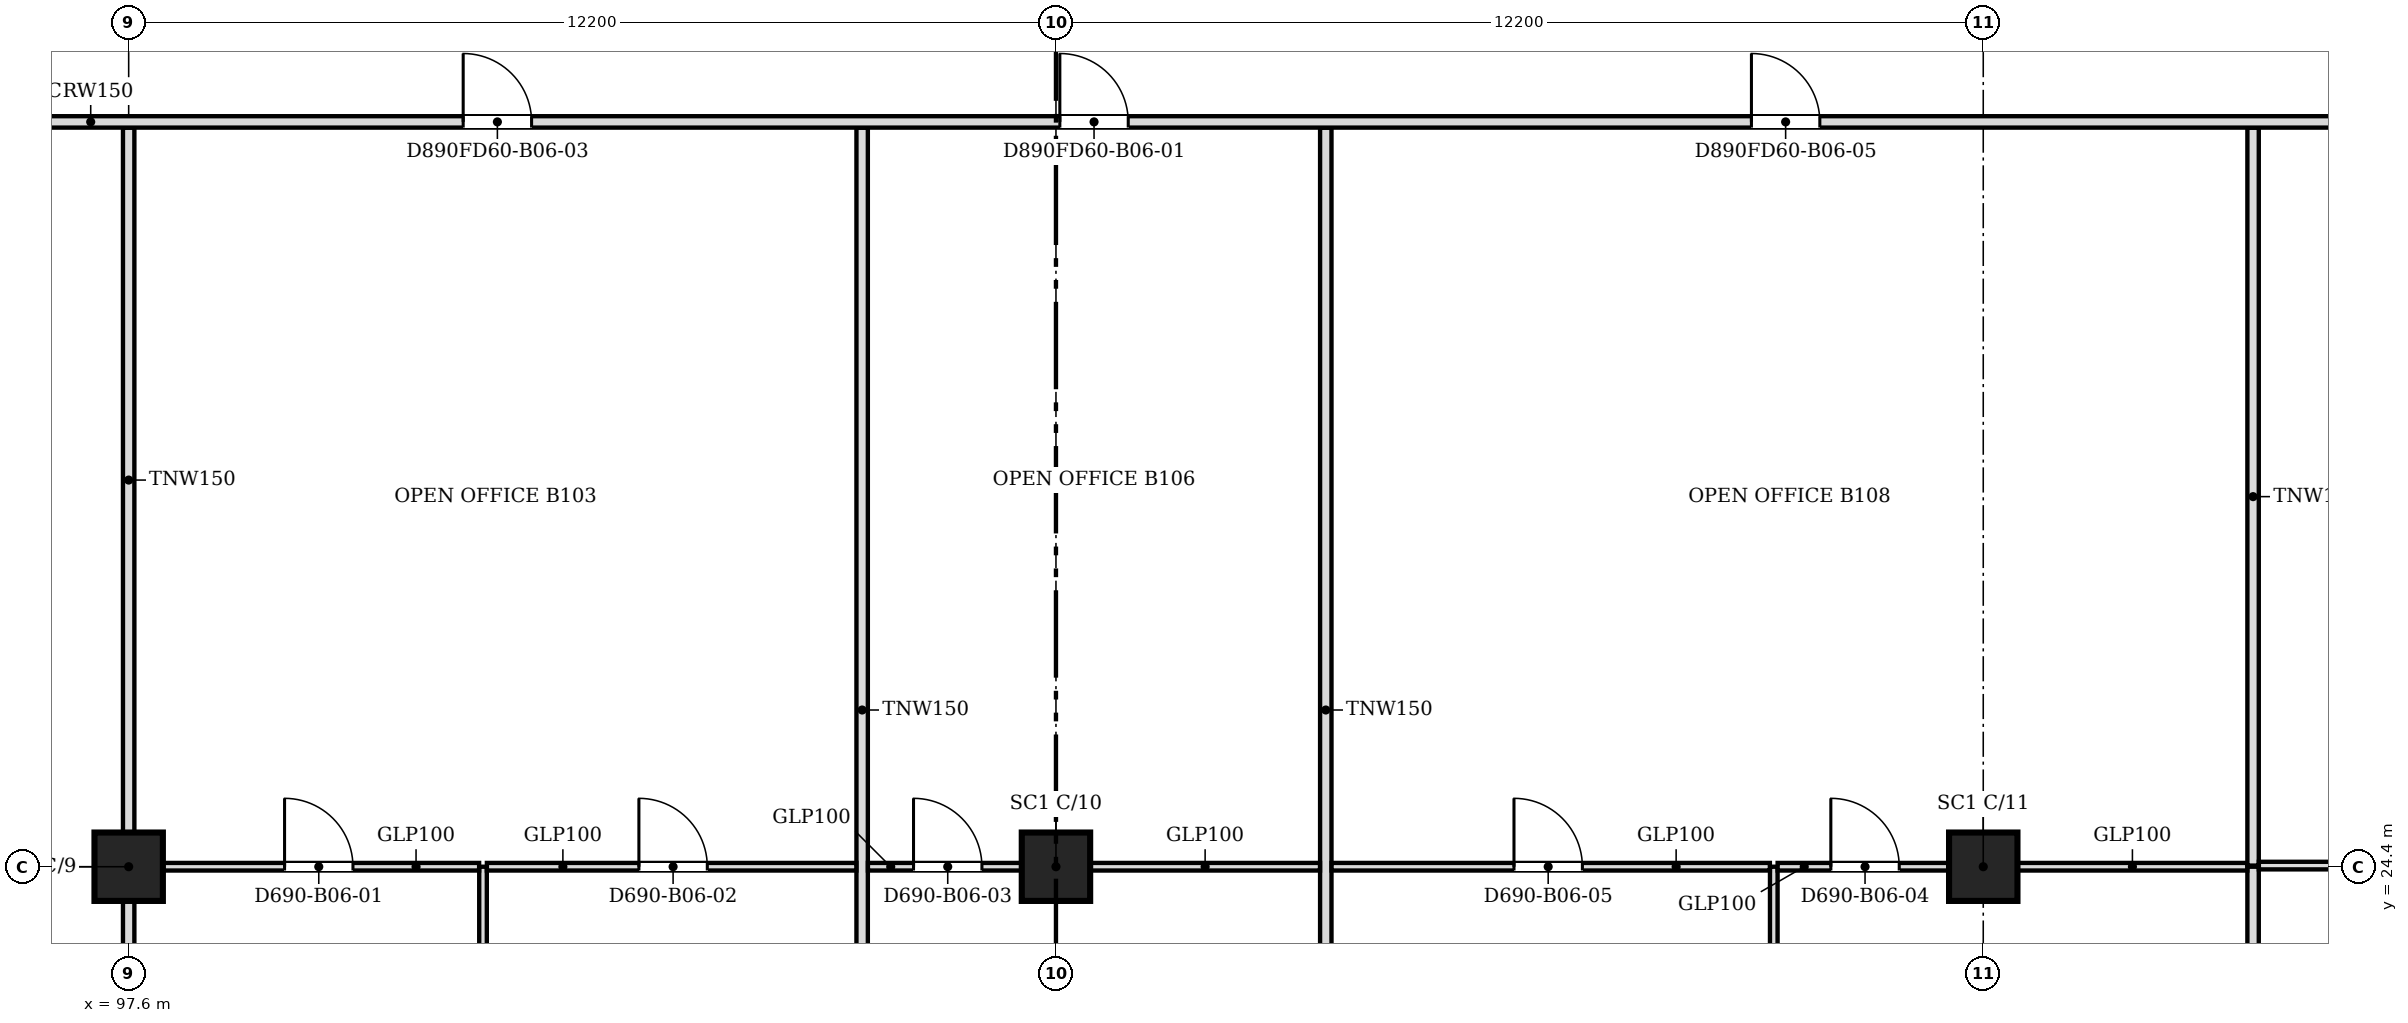
"""IFC4 building model, lengths in metres.
Left out: names, types, materials, properties, quantities, classifications, styles, units other than length and angle.
Written with IfcOpenShell. Run it as: python <this file> out.ifc"""

import sys

from ifc_helpers import new_model, si_unit, direction, frame, frame_2d, origin, origin_2d, place, context, subcontext, project, spatial, rectangle, extrude, source, transform, mapped, element, fill, save


model = new_model("IFC4")
c1 = context("Model", 3, precision=1e-05, world=origin(), true_north=direction((0.0, 1.0)))
c2 = subcontext(c1, "Body", "Model", "MODEL_VIEW")
j1 = project(units=[si_unit("LENGTHUNIT", "METRE"), si_unit("PLANEANGLEUNIT", "RADIAN")], contexts=[c1])
p1 = place(None, origin())
s1 = spatial("IfcSite", under=j1, at=p1, CompositionType="ELEMENT")
p2 = place(p1, origin())
s2 = spatial("IfcBuilding", under=s1, at=p2, CompositionType="ELEMENT")
p3 = place(p2, frame((0.0, 0.0, 56.2)))
s3 = spatial("IfcBuildingStorey", under=s2, at=p3, CompositionType="ELEMENT", Elevation=56.2)
for number, where, z_axis, x_axis in (
    (1, (97.6, 24.4, 0.0), (0.0, 0.0, 1.0), (1.0, 0.0, 0.0)),
    (2, (109.8, 24.4, 0.0), (0.0, 0.0, 1.0), (1.0, 0.0, 0.0)),
    (3, (122.0, 24.4, 0.0), (0.0, 0.0, 1.0), (1.0, 0.0, 0.0)),
):
    element("IfcColumn", number, at=place(p3, frame(where, z_axis=z_axis, x_axis=x_axis)), inside=s3, PredefinedType="COLUMN", context=c2, shape_type="SweptSolid", body=[
        extrude(rectangle(XDim=0.9, YDim=0.9, at=origin_2d()), origin(), (0.0, 0.0, 1.0), 3.6),
    ])
p4 = place(p3, frame((97.6, 18.8, 0.0), z_axis=(0.0, 0.0, 1.0), x_axis=(0.0, 1.0, 0.0)))
e4 = element("IfcWall", 4, at=p4, inside=s3, PredefinedType="PARTITIONING", context=c2, shape_type="SweptSolid", body=[
    extrude(rectangle(XDim=5.149, YDim=0.15, at=frame_2d((2.574, 0.0))), origin(), (0.0, 0.0, 1.0), 3.067),
])
p5 = place(p3, frame((102.262, 18.8, 0.0), z_axis=(0.0, 0.0, 1.0), x_axis=(0.0, 1.0, 0.0)))
e5 = element("IfcWall", 5, at=p5, inside=s3, PredefinedType="PARTITIONING", context=c2, shape_type="SweptSolid", body=[
    extrude(rectangle(XDim=5.6, YDim=0.1, at=frame_2d((2.8, 0.0))), origin(), (0.0, 0.0, 1.0), 3.067),
])
for number, where, z_axis, x_axis in (
    (6, (107.25, 18.8, 0.0), (0.0, 0.0, 1.0), (0.0, 1.0, 0.0)),
    (7, (113.35, 18.8, 0.0), (0.0, 0.0, 1.0), (0.0, 1.0, 0.0)),
):
    element("IfcWall", number, at=place(p3, frame(where, z_axis=z_axis, x_axis=x_axis)), inside=s3, PredefinedType="PARTITIONING", context=c2, shape_type="SweptSolid", body=[
        extrude(rectangle(XDim=15.324, YDim=0.15, at=frame_2d((7.662, 0.0))), origin(), (0.0, 0.0, 1.0), 3.067),
    ])
p6 = place(p3, frame((119.244, 18.8, 0.0), z_axis=(0.0, 0.0, 1.0), x_axis=(0.0, 1.0, 0.0)))
e8 = element("IfcWall", 8, at=p6, inside=s3, PredefinedType="PARTITIONING", context=c2, shape_type="SweptSolid", body=[
    extrude(rectangle(XDim=5.6, YDim=0.1, at=frame_2d((2.8, 0.0))), origin(), (0.0, 0.0, 1.0), 3.067),
])
p7 = place(p3, frame((125.55, 18.8, 0.0), z_axis=(0.0, 0.0, 1.0), x_axis=(0.0, 1.0, 0.0)))
e9 = element("IfcWall", 9, at=p7, inside=s3, PredefinedType="PARTITIONING", context=c2, shape_type="SweptSolid", body=[
    extrude(rectangle(XDim=5.6, YDim=0.15, at=frame_2d((2.8, 0.0))), origin(), (0.0, 0.0, 1.0), 3.067),
])
p8 = place(p3, frame((102.211, 24.4, 0.0), z_axis=(0.0, 0.0, 1.0), x_axis=(-1.0, 0.0, 0.0)))
e10 = element("IfcWall", 10, at=p8, inside=s3, PredefinedType="PARTITIONING", context=c2, shape_type="SweptSolid", body=[
    extrude(rectangle(XDim=4.16, YDim=0.1, at=frame_2d((2.08, 0.0))), origin(), (0.0, 0.0, 1.0), 3.067),
])
m1 = source(origin(), c2, "Body", "SweptSolid", [
    extrude(rectangle(XDim=0.9, YDim=2.1, at=frame_2d((0.45, 1.05))), frame((0.0, 0.06, 0.0), z_axis=(0.0, -1.0, 0.0), x_axis=(1.0, 0.0, 0.0)), (0.0, 0.0, 1.0), 0.12),
])
p9 = place(p8, frame((1.66, 0.0, 0.0)))
e11 = element("IfcOpeningElement", 11, at=p9, cuts=e10, PredefinedType="OPENING", context=c2, shape_type="MappedRepresentation", body=[
    mapped(m1, transform((0.0, 0.0, 0.0), scale=1.0)),
])
p10 = place(p3, frame((107.174, 24.4, 0.0), z_axis=(0.0, 0.0, 1.0), x_axis=(-1.0, 0.0, 0.0)))
e12 = element("IfcWall", 12, at=p10, inside=s3, PredefinedType="PARTITIONING", context=c2, shape_type="SweptSolid", body=[
    extrude(rectangle(XDim=4.861, YDim=0.1, at=frame_2d((2.431, 0.0))), origin(), (0.0, 0.0, 1.0), 3.067),
])
p11 = place(p10, frame((1.961, 0.0, 0.0)))
e13 = element("IfcOpeningElement", 13, at=p11, cuts=e12, PredefinedType="OPENING", context=c2, shape_type="MappedRepresentation", body=[
    mapped(m1, transform((0.0, 0.0, 0.0), scale=1.0)),
])
p12 = place(p3, frame((109.349, 24.4, 0.0), z_axis=(0.0, 0.0, 1.0), x_axis=(-1.0, 0.0, 0.0)))
e14 = element("IfcWall", 14, at=p12, inside=s3, PredefinedType="PARTITIONING", context=c2, shape_type="SweptSolid", body=[
    extrude(rectangle(XDim=2.023, YDim=0.1, at=frame_2d((1.012, 0.0))), origin(), (0.0, 0.0, 1.0), 3.067),
])
p13 = place(p12, frame((0.523, 0.0, 0.0)))
e15 = element("IfcOpeningElement", 15, at=p13, cuts=e14, PredefinedType="OPENING", context=c2, shape_type="MappedRepresentation", body=[
    mapped(m1, transform((0.0, 0.0, 0.0), scale=1.0)),
])
p14 = place(p3, frame((110.251, 24.4, 0.0), z_axis=(0.0, 0.0, 1.0), x_axis=(1.0, 0.0, 0.0)))
e16 = element("IfcWall", 16, at=p14, inside=s3, PredefinedType="PARTITIONING", context=c2, shape_type="SweptSolid", body=[
    extrude(rectangle(XDim=3.023, YDim=0.1, at=frame_2d((1.511, 0.0))), origin(), (0.0, 0.0, 1.0), 3.067),
])
p15 = place(p3, frame((119.193, 24.4, 0.0), z_axis=(0.0, 0.0, 1.0), x_axis=(-1.0, 0.0, 0.0)))
e17 = element("IfcWall", 17, at=p15, inside=s3, PredefinedType="PARTITIONING", context=c2, shape_type="SweptSolid", body=[
    extrude(rectangle(XDim=5.767, YDim=0.1, at=frame_2d((2.883, 0.0))), origin(), (0.0, 0.0, 1.0), 3.067),
])
p16 = place(p15, frame((2.467, 0.0, 0.0)))
e18 = element("IfcOpeningElement", 18, at=p16, cuts=e17, PredefinedType="OPENING", context=c2, shape_type="MappedRepresentation", body=[
    mapped(m1, transform((0.0, 0.0, 0.0), scale=1.0)),
])
p17 = place(p3, frame((121.549, 24.4, 0.0), z_axis=(0.0, 0.0, 1.0), x_axis=(-1.0, 0.0, 0.0)))
e19 = element("IfcWall", 19, at=p17, inside=s3, PredefinedType="PARTITIONING", context=c2, shape_type="SweptSolid", body=[
    extrude(rectangle(XDim=2.254, YDim=0.1, at=frame_2d((1.127, 0.0))), origin(), (0.0, 0.0, 1.0), 3.067),
])
p18 = place(p17, frame((0.654, 0.0, 0.0)))
e20 = element("IfcOpeningElement", 20, at=p18, cuts=e19, PredefinedType="OPENING", context=c2, shape_type="MappedRepresentation", body=[
    mapped(m1, transform((0.0, 0.0, 0.0), scale=1.0)),
])
p19 = place(p3, frame((122.451, 24.4, 0.0), z_axis=(0.0, 0.0, 1.0), x_axis=(1.0, 0.0, 0.0)))
e21 = element("IfcWall", 21, at=p19, inside=s3, PredefinedType="PARTITIONING", context=c2, shape_type="SweptSolid", body=[
    extrude(rectangle(XDim=3.023, YDim=0.1, at=frame_2d((1.512, 0.0))), origin(), (0.0, 0.0, 1.0), 3.067),
])
p20 = place(p3, frame((125.55, 24.415, 0.0), z_axis=(0.0, 0.0, 1.0), x_axis=(0.0, 1.0, 0.0)))
e22 = element("IfcWall", 22, at=p20, inside=s3, PredefinedType="PARTITIONING", context=c2, shape_type="SweptSolid", body=[
    extrude(rectangle(XDim=9.709, YDim=0.15, at=frame_2d((4.854, 0.0))), origin(), (0.0, 0.0, 1.0), 3.067),
])
p21 = place(p3, frame((133.67, 24.415, 0.0), z_axis=(0.0, 0.0, 1.0), x_axis=(-1.0, 0.0, 0.0)))
e23 = element("IfcWall", 23, at=p21, inside=s3, PredefinedType="PARTITIONING", context=c2, shape_type="SweptSolid", body=[
    extrude(rectangle(XDim=8.044, YDim=0.1, at=frame_2d((4.022, 0.0))), origin(), (0.0, 0.0, 1.0), 3.067),
])
p22 = place(p21, frame((3.544, 0.0, 0.0)))
e24 = element("IfcOpeningElement", 24, at=p22, cuts=e23, PredefinedType="OPENING", context=c2, shape_type="MappedRepresentation", body=[
    mapped(m1, transform((0.0, 0.0, 0.0), scale=1.0)),
])
p23 = place(p3, frame((97.6, 24.851, 0.0), z_axis=(0.0, 0.0, 1.0), x_axis=(0.0, 1.0, 0.0)))
e25 = element("IfcWall", 25, at=p23, inside=s3, PredefinedType="PARTITIONING", context=c2, shape_type="SweptSolid", body=[
    extrude(rectangle(XDim=9.273, YDim=0.15, at=frame_2d((4.636, 0.0))), origin(), (0.0, 0.0, 1.0), 3.067),
])
p24 = place(p3, frame((133.7, 34.2, 0.0), z_axis=(0.0, 0.0, 1.0), x_axis=(-1.0, 0.0, 0.0)))
e26 = element("IfcWall", 26, at=p24, inside=s3, PredefinedType="PARTITIONING", context=c2, shape_type="SweptSolid", body=[
    extrude(rectangle(XDim=47.8, YDim=0.15, at=frame_2d((23.9, 0.0))), origin(), (0.0, 0.0, 1.0), 3.067),
])
m2 = source(origin(), c2, "Body", "SweptSolid", [
    extrude(rectangle(XDim=0.9, YDim=2.1, at=frame_2d((0.45, 1.05))), frame((0.0, 0.085, 0.0), z_axis=(0.0, -1.0, 0.0), x_axis=(1.0, 0.0, 0.0)), (0.0, 0.0, 1.0), 0.17),
])
p25 = place(p24, frame((22.949, 0.0, 0.0)))
e27 = element("IfcOpeningElement", 27, at=p25, cuts=e26, PredefinedType="OPENING", context=c2, shape_type="MappedRepresentation", body=[
    mapped(m2, transform((0.0, 0.0, 0.0), scale=1.0)),
])
p26 = place(p24, frame((3.649, 0.0, 0.0)))
e28 = element("IfcOpeningElement", 28, at=p26, cuts=e26, PredefinedType="OPENING", context=c2, shape_type="MappedRepresentation", body=[
    mapped(m2, transform((0.0, 0.0, 0.0), scale=1.0)),
])
p27 = place(p24, frame((30.799, 0.0, 0.0)))
e29 = element("IfcOpeningElement", 29, at=p27, cuts=e26, PredefinedType="OPENING", context=c2, shape_type="MappedRepresentation", body=[
    mapped(m2, transform((0.0, 0.0, 0.0), scale=1.0)),
])
p28 = place(p24, frame((41.5, 0.0, 0.0)))
e30 = element("IfcOpeningElement", 30, at=p28, cuts=e26, PredefinedType="OPENING", context=c2, shape_type="MappedRepresentation", body=[
    mapped(m2, transform((0.0, 0.0, 0.0), scale=1.0)),
])
p29 = place(p24, frame((13.85, 0.0, 0.0)))
e31 = element("IfcOpeningElement", 31, at=p29, cuts=e26, PredefinedType="OPENING", context=c2, shape_type="MappedRepresentation", body=[
    mapped(m2, transform((0.0, 0.0, 0.0), scale=1.0)),
])
m3 = source(origin(), c2, "Body", "SweptSolid", [
    extrude(rectangle(XDim=0.9, YDim=2.1, at=frame_2d((0.45, 1.05))), frame((0.0, 0.025, 0.0), z_axis=(0.0, -1.0, 0.0), x_axis=(1.0, 0.0, 0.0)), (0.0, 0.0, 1.0), 0.05),
])
p30 = place(p9, origin())
e32 = element("IfcDoor", 32, at=p30, inside=s3, OperationType="SINGLE_SWING_RIGHT", PredefinedType="DOOR", context=c2, shape_type="MappedRepresentation", body=[
    mapped(m3, transform((0.0, 0.0, 0.0), scale=1.0)),
])
fill(e11, e32)
p31 = place(p11, origin())
e33 = element("IfcDoor", 33, at=p31, inside=s3, OperationType="SINGLE_SWING_RIGHT", PredefinedType="DOOR", context=c2, shape_type="MappedRepresentation", body=[
    mapped(m3, transform((0.0, 0.0, 0.0), scale=1.0)),
])
fill(e13, e33)
p32 = place(p13, origin())
e34 = element("IfcDoor", 34, at=p32, inside=s3, OperationType="SINGLE_SWING_RIGHT", PredefinedType="DOOR", context=c2, shape_type="MappedRepresentation", body=[
    mapped(m3, transform((0.0, 0.0, 0.0), scale=1.0)),
])
fill(e15, e34)
p33 = place(p18, origin())
e35 = element("IfcDoor", 35, at=p33, inside=s3, OperationType="SINGLE_SWING_RIGHT", PredefinedType="DOOR", context=c2, shape_type="MappedRepresentation", body=[
    mapped(m3, transform((0.0, 0.0, 0.0), scale=1.0)),
])
fill(e20, e35)
p34 = place(p16, origin())
e36 = element("IfcDoor", 36, at=p34, inside=s3, OperationType="SINGLE_SWING_RIGHT", PredefinedType="DOOR", context=c2, shape_type="MappedRepresentation", body=[
    mapped(m3, transform((0.0, 0.0, 0.0), scale=1.0)),
])
fill(e18, e36)
p35 = place(p25, origin())
e37 = element("IfcDoor", 37, at=p35, inside=s3, OperationType="SINGLE_SWING_RIGHT", PredefinedType="DOOR", context=c2, shape_type="MappedRepresentation", body=[
    mapped(m3, transform((0.0, 0.0, 0.0), scale=1.0)),
])
fill(e27, e37)
p36 = place(p27, origin())
e38 = element("IfcDoor", 38, at=p36, inside=s3, OperationType="SINGLE_SWING_RIGHT", PredefinedType="DOOR", context=c2, shape_type="MappedRepresentation", body=[
    mapped(m3, transform((0.0, 0.0, 0.0), scale=1.0)),
])
fill(e29, e38)
p37 = place(p29, origin())
e39 = element("IfcDoor", 39, at=p37, inside=s3, OperationType="SINGLE_SWING_RIGHT", PredefinedType="DOOR", context=c2, shape_type="MappedRepresentation", body=[
    mapped(m3, transform((0.0, 0.0, 0.0), scale=1.0)),
])
fill(e31, e39)
save(model, sys.argv[1])
